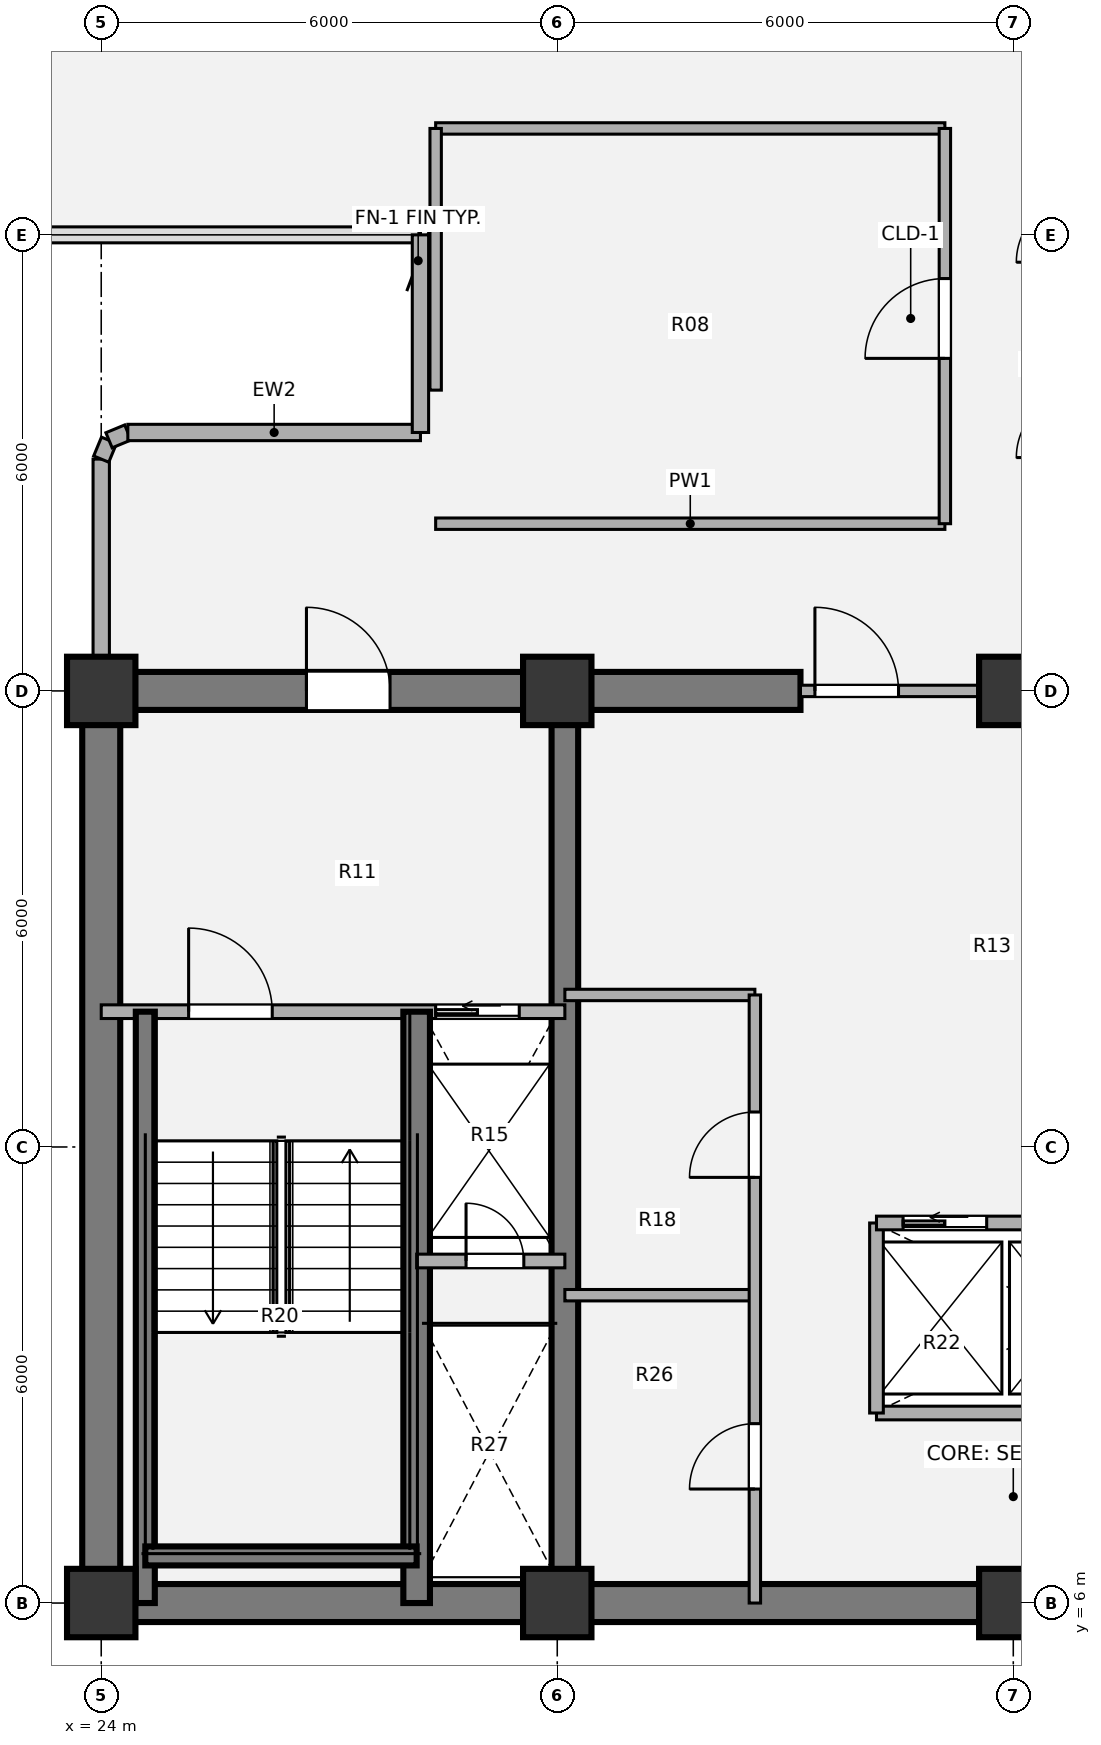
"""IFC4 building model, lengths in metres.
Left out: names, types, materials, properties, quantities, classifications, styles, units other than length and angle.
Written with IfcOpenShell. Run it as: python <this file> out.ifc"""

import sys

from ifc_helpers import new_model, si_unit, direction, frame, frame_2d, origin, origin_2d, place, context, subcontext, project, spatial, rectangle, extrude, source, transform, mapped, element, fill, save


model = new_model("IFC4")
c1 = context("Model", 3, precision=1e-05, world=origin(), true_north=direction((0.0, 1.0)))
c2 = subcontext(c1, "Body", "Model", "MODEL_VIEW")
j1 = project(units=[si_unit("LENGTHUNIT", "METRE"), si_unit("PLANEANGLEUNIT", "RADIAN")], contexts=[c1])
p1 = place(None, origin())
s1 = spatial("IfcSite", under=j1, at=p1, CompositionType="ELEMENT")
p2 = place(p1, origin())
s2 = spatial("IfcBuilding", under=s1, at=p2, CompositionType="ELEMENT")
p3 = place(p2, frame((0.0, 0.0, 112.5)))
s3 = spatial("IfcBuildingStorey", under=s2, at=p3, CompositionType="ELEMENT", Elevation=112.5)
m1 = source(origin(), c2, "Body", "SweptSolid", [
    extrude(rectangle(XDim=0.9, YDim=0.9, at=origin_2d()), origin(), (0.0, 0.0, 1.0), 3.78),
])
for number, where, z_axis, x_axis in (
    (1, (24.0, 6.0, 0.0), (0.0, 0.0, 1.0), (1.0, 0.0, 0.0)),
    (2, (30.0, 6.0, 0.0), (0.0, 0.0, 1.0), (1.0, 0.0, 0.0)),
    (3, (36.0, 6.0, 0.0), (0.0, 0.0, 1.0), (1.0, 0.0, 0.0)),
    (4, (24.0, 18.0, 0.0), (0.0, 0.0, 1.0), (1.0, 0.0, 0.0)),
    (5, (30.0, 18.0, 0.0), (0.0, 0.0, 1.0), (1.0, 0.0, 0.0)),
    (6, (36.0, 18.0, 0.0), (0.0, 0.0, 1.0), (1.0, 0.0, 0.0)),
):
    element("IfcColumn", number, at=place(p3, frame(where, z_axis=z_axis, x_axis=x_axis)), inside=s3, PredefinedType="COLUMN", context=c2, shape_type="MappedRepresentation", body=[
        mapped(m1, transform((0.0, 0.0, 0.0), x_axis=(1.0, 0.0, 0.0), y_axis=(0.0, 1.0, 0.0), z_axis=(0.0, 0.0, 1.0), scale=1.0)),
    ])
p4 = place(p3, frame((48.25, 6.0, 0.0), z_axis=(0.0, 0.0, 1.0), x_axis=(-1.0, 0.0, 0.0)))
e7 = element("IfcWall", 7, at=p4, inside=s3, PredefinedType="SHEAR", context=c2, shape_type="SweptSolid", body=[
    extrude(rectangle(XDim=24.5, YDim=0.5, at=frame_2d((12.25, 0.0))), origin(), (0.0, 0.0, 1.0), 3.78),
])
p5 = place(p3, frame((24.0, 6.0, 0.0), z_axis=(0.0, 0.0, 1.0), x_axis=(0.0, 1.0, 0.0)))
e8 = element("IfcWall", 8, at=p5, inside=s3, PredefinedType="SHEAR", context=c2, shape_type="SweptSolid", body=[
    extrude(rectangle(XDim=12.0, YDim=0.5, at=frame_2d((6.0, 0.0))), origin(), (0.0, 0.0, 1.0), 3.78),
])
p6 = place(p3, frame((23.75, 18.0, 0.0), z_axis=(0.0, 0.0, 1.0), x_axis=(1.0, 0.0, 0.0)))
e9 = element("IfcWall", 9, at=p6, inside=s3, PredefinedType="SHEAR", context=c2, shape_type="SweptSolid", body=[
    extrude(rectangle(XDim=9.45, YDim=0.5, at=frame_2d((4.725, 0.0))), origin(), (0.0, 0.0, 1.0), 3.78),
])
p7 = place(p6, frame((2.95, 0.0, 0.0)))
e10 = element("IfcOpeningElement", 10, at=p7, cuts=e9, PredefinedType="OPENING", context=c2, shape_type="SweptSolid", body=[
    extrude(rectangle(XDim=1.1, YDim=2.1, at=origin_2d()), frame((0.55, 0.26, 1.05), z_axis=(0.0, -1.0, 0.0), x_axis=(1.0, 0.0, 0.0)), (0.0, 0.0, 1.0), 0.52),
])
p8 = place(p3, frame((30.1, 6.0, 0.0), z_axis=(0.0, 0.0, 1.0), x_axis=(0.0, 1.0, 0.0)))
e11 = element("IfcWall", 11, at=p8, inside=s3, PredefinedType="SHEAR", context=c2, shape_type="SweptSolid", body=[
    extrude(rectangle(XDim=12.0, YDim=0.35, at=frame_2d((6.0, 0.0))), origin(), (0.0, 0.0, 1.0), 3.78),
])
p9 = place(p3, frame((24.0, 18.43, 0.0), z_axis=(0.0, 0.0, 1.0), x_axis=(0.0, 1.0, 0.0)))
e12 = element("IfcWall", 12, at=p9, inside=s3, PredefinedType="SOLIDWALL", context=c2, shape_type="SweptSolid", body=[
    extrude(rectangle(XDim=2.62, YDim=0.215, at=frame_2d((1.31, 0.0))), origin(), (0.0, 0.0, 1.0), 3.53),
])
p10 = place(p3, frame((24.0, 21.05, 0.0), z_axis=(0.0, 0.0, 1.0), x_axis=(0.382673670509, 0.923883575944, 0.0)))
e13 = element("IfcWall", 13, at=p10, inside=s3, PredefinedType="SOLIDWALL", context=c2, shape_type="SweptSolid", body=[
    extrude(rectangle(XDim=0.268, YDim=0.215, at=frame_2d((0.134, 0.0))), origin(), (0.0, 0.0, 1.0), 3.53),
])
p11 = place(p3, frame((24.103, 21.298, 0.0), z_axis=(0.0, 0.0, 1.0), x_axis=(0.924205486139, 0.381895560841, 0.0)))
e14 = element("IfcWall", 14, at=p11, inside=s3, PredefinedType="SOLIDWALL", context=c2, shape_type="SweptSolid", body=[
    extrude(rectangle(XDim=0.268, YDim=0.215, at=frame_2d((0.134, 0.0))), origin(), (0.0, 0.0, 1.0), 3.53),
])
p12 = place(p3, frame((24.35, 21.4, 0.0), z_axis=(0.0, 0.0, 1.0), x_axis=(1.0, 0.0, 0.0)))
e15 = element("IfcWall", 15, at=p12, inside=s3, PredefinedType="SOLIDWALL", context=c2, shape_type="SweptSolid", body=[
    extrude(rectangle(XDim=3.85, YDim=0.215, at=frame_2d((1.925, 0.0))), origin(), (0.0, 0.0, 1.0), 3.53),
])
p13 = place(p3, frame((28.2, 21.4, 0.0), z_axis=(0.0, 0.0, 1.0), x_axis=(0.0, 1.0, 0.0)))
e16 = element("IfcWall", 16, at=p13, inside=s3, PredefinedType="SOLIDWALL", context=c2, shape_type="SweptSolid", body=[
    extrude(rectangle(XDim=2.6, YDim=0.215, at=frame_2d((1.3, 0.0))), origin(), (0.0, 0.0, 1.0), 3.53),
])
p14 = place(p3, frame((30.1, 14.0, 0.0), z_axis=(0.0, 0.0, 1.0), x_axis=(1.0, 0.0, 0.0)))
e17 = element("IfcWall", 17, at=p14, inside=s3, PredefinedType="PARTITIONING", context=c2, shape_type="SweptSolid", body=[
    extrude(rectangle(XDim=2.5, YDim=0.15, at=frame_2d((1.25, 0.0))), origin(), (0.0, 0.0, 1.0), 3.5),
])
p15 = place(p3, frame((34.2, 8.5, 0.0), z_axis=(0.0, 0.0, 1.0), x_axis=(1.0, 0.0, 0.0)))
e18 = element("IfcWall", 18, at=p15, inside=s3, PredefinedType="PARTITIONING", context=c2, shape_type="SweptSolid", body=[
    extrude(rectangle(XDim=5.15, YDim=0.18, at=frame_2d((2.575, 0.0))), origin(), (0.0, 0.0, 1.0), 3.5),
])
p16 = place(p3, frame((34.2, 8.5, 0.0), z_axis=(0.0, 0.0, 1.0), x_axis=(0.0, 1.0, 0.0)))
e19 = element("IfcWall", 19, at=p16, inside=s3, PredefinedType="PARTITIONING", context=c2, shape_type="SweptSolid", body=[
    extrude(rectangle(XDim=2.5, YDim=0.18, at=frame_2d((1.25, 0.0))), origin(), (0.0, 0.0, 1.0), 3.5),
])
p17 = place(p3, frame((30.1, 10.05, 0.0), z_axis=(0.0, 0.0, 1.0), x_axis=(1.0, 0.0, 0.0)))
e20 = element("IfcWall", 20, at=p17, inside=s3, PredefinedType="PARTITIONING", context=c2, shape_type="SweptSolid", body=[
    extrude(rectangle(XDim=2.5, YDim=0.15, at=frame_2d((1.25, 0.0))), origin(), (0.0, 0.0, 1.0), 3.5),
])
p18 = place(p3, frame((32.6, 6.0, 0.0), z_axis=(0.0, 0.0, 1.0), x_axis=(0.0, 1.0, 0.0)))
e21 = element("IfcWall", 21, at=p18, inside=s3, PredefinedType="PARTITIONING", context=c2, shape_type="SweptSolid", body=[
    extrude(rectangle(XDim=8.0, YDim=0.15, at=frame_2d((4.0, 0.0))), origin(), (0.0, 0.0, 1.0), 3.5),
])
p19 = place(p18, frame((1.5, 0.0, 0.0)))
e22 = element("IfcOpeningElement", 22, at=p19, cuts=e21, PredefinedType="OPENING", context=c2, shape_type="SweptSolid", body=[
    extrude(rectangle(XDim=0.86, YDim=2.1, at=origin_2d()), frame((0.43, 0.085, 1.05), z_axis=(0.0, -1.0, 0.0), x_axis=(1.0, 0.0, 0.0)), (0.0, 0.0, 1.0), 0.17),
])
p20 = place(p18, frame((5.6, 0.0, 0.0)))
e23 = element("IfcOpeningElement", 23, at=p20, cuts=e21, PredefinedType="OPENING", context=c2, shape_type="SweptSolid", body=[
    extrude(rectangle(XDim=0.86, YDim=2.1, at=origin_2d()), frame((0.43, 0.085, 1.05), z_axis=(0.0, -1.0, 0.0), x_axis=(1.0, 0.0, 0.0)), (0.0, 0.0, 1.0), 0.17),
])
p21 = place(p3, frame((33.2, 18.0, 0.0), z_axis=(0.0, 0.0, 1.0), x_axis=(1.0, 0.0, 0.0)))
e24 = element("IfcWall", 24, at=p21, inside=s3, PredefinedType="PARTITIONING", context=c2, shape_type="SweptSolid", body=[
    extrude(rectangle(XDim=5.6, YDim=0.15, at=frame_2d((2.8, 0.0))), origin(), (0.0, 0.0, 1.0), 2.315),
])
p22 = place(p21, frame((0.19, 0.0, 0.0)))
e25 = element("IfcOpeningElement", 25, at=p22, cuts=e24, PredefinedType="OPENING", context=c2, shape_type="SweptSolid", body=[
    extrude(rectangle(XDim=1.1, YDim=2.1, at=origin_2d()), frame((0.55, 0.085, 1.05), z_axis=(0.0, -1.0, 0.0), x_axis=(1.0, 0.0, 0.0)), (0.0, 0.0, 1.0), 0.17),
])
p23 = place(p21, frame((4.31, 0.0, 0.0)))
e26 = element("IfcOpeningElement", 26, at=p23, cuts=e24, PredefinedType="OPENING", context=c2, shape_type="SweptSolid", body=[
    extrude(rectangle(XDim=1.1, YDim=2.1, at=origin_2d()), frame((0.55, 0.085, 1.05), z_axis=(0.0, -1.0, 0.0), x_axis=(1.0, 0.0, 0.0)), (0.0, 0.0, 1.0), 0.17),
])
p24 = place(p3, frame((24.0, 13.78, 0.0), z_axis=(0.0, 0.0, 1.0), x_axis=(1.0, 0.0, 0.0)))
e27 = element("IfcWall", 27, at=p24, inside=s3, PredefinedType="PARTITIONING", context=c2, shape_type="SweptSolid", body=[
    extrude(rectangle(XDim=6.1, YDim=0.18, at=frame_2d((3.05, 0.0))), origin(), (0.0, 0.0, 1.0), 3.5),
])
p25 = place(p24, frame((1.15, 0.0, 0.0)))
e28 = element("IfcOpeningElement", 28, at=p25, cuts=e27, PredefinedType="OPENING", context=c2, shape_type="SweptSolid", body=[
    extrude(rectangle(XDim=1.1, YDim=2.1, at=origin_2d()), frame((0.55, 0.1, 1.05), z_axis=(0.0, -1.0, 0.0), x_axis=(1.0, 0.0, 0.0)), (0.0, 0.0, 1.0), 0.2),
])
p26 = place(p24, frame((4.4, 0.0, 0.0)))
e29 = element("IfcOpeningElement", 29, at=p26, cuts=e27, PredefinedType="OPENING", context=c2, shape_type="SweptSolid", body=[
    extrude(rectangle(XDim=1.1, YDim=2.1, at=origin_2d()), frame((0.55, 0.1, 1.05), z_axis=(0.0, -1.0, 0.0), x_axis=(1.0, 0.0, 0.0)), (0.0, 0.0, 1.0), 0.2),
])
p27 = place(p3, frame((28.15, 6.0, 0.0), z_axis=(0.0, 0.0, 1.0), x_axis=(0.0, 1.0, 0.0)))
e30 = element("IfcWall", 30, at=p27, inside=s3, PredefinedType="SHEAR", context=c2, shape_type="SweptSolid", body=[
    extrude(rectangle(XDim=7.78, YDim=0.35, at=frame_2d((3.89, 0.0))), origin(), (0.0, 0.0, 1.0), 3.85),
])
p28 = place(p3, frame((24.58, 6.0, 0.0), z_axis=(0.0, 0.0, 1.0), x_axis=(0.0, 1.0, 0.0)))
e31 = element("IfcWall", 31, at=p28, inside=s3, PredefinedType="SHEAR", context=c2, shape_type="SweptSolid", body=[
    extrude(rectangle(XDim=7.78, YDim=0.25, at=frame_2d((3.89, 0.0))), origin(), (0.0, 0.0, 1.0), 3.85),
])
p29 = place(p3, frame((24.58, 6.62, 0.0), z_axis=(0.0, 0.0, 1.0), x_axis=(1.0, 0.0, 0.0)))
e32 = element("IfcWall", 32, at=p29, inside=s3, PredefinedType="SHEAR", context=c2, shape_type="SweptSolid", body=[
    extrude(rectangle(XDim=3.57, YDim=0.25, at=frame_2d((1.785, 0.0))), origin(), (0.0, 0.0, 1.0), 3.85),
])
p30 = place(p3, frame((28.15, 10.5, 0.0), z_axis=(0.0, 0.0, 1.0), x_axis=(1.0, 0.0, 0.0)))
e33 = element("IfcWall", 33, at=p30, inside=s3, PredefinedType="PARTITIONING", context=c2, shape_type="SweptSolid", body=[
    extrude(rectangle(XDim=1.95, YDim=0.18, at=frame_2d((0.975, 0.0))), origin(), (0.0, 0.0, 1.0), 3.5),
])
p31 = place(p30, frame((0.65, 0.0, 0.0)))
e34 = element("IfcOpeningElement", 34, at=p31, cuts=e33, PredefinedType="OPENING", context=c2, shape_type="SweptSolid", body=[
    extrude(rectangle(XDim=0.76, YDim=2.05, at=origin_2d()), frame((0.38, 0.1, 1.025), z_axis=(0.0, -1.0, 0.0), x_axis=(1.0, 0.0, 0.0)), (0.0, 0.0, 1.0), 0.2),
])
p32 = place(p3, frame((34.2, 11.0, 0.0), z_axis=(0.0, 0.0, 1.0), x_axis=(1.0, 0.0, 0.0)))
e35 = element("IfcWall", 35, at=p32, inside=s3, PredefinedType="PARTITIONING", context=c2, shape_type="SweptSolid", body=[
    extrude(rectangle(XDim=5.15, YDim=0.18, at=frame_2d((2.575, 0.0))), origin(), (0.0, 0.0, 1.0), 3.5),
])
p33 = place(p32, frame((0.35, 0.0, 0.0)))
e36 = element("IfcOpeningElement", 36, at=p33, cuts=e35, PredefinedType="OPENING", context=c2, shape_type="SweptSolid", body=[
    extrude(rectangle(XDim=1.1, YDim=2.1, at=origin_2d()), frame((0.55, 0.1, 1.05), z_axis=(0.0, -1.0, 0.0), x_axis=(1.0, 0.0, 0.0)), (0.0, 0.0, 1.0), 0.2),
])
p34 = place(p32, frame((2.05, 0.0, 0.0)))
e37 = element("IfcOpeningElement", 37, at=p34, cuts=e35, PredefinedType="OPENING", context=c2, shape_type="SweptSolid", body=[
    extrude(rectangle(XDim=1.1, YDim=2.1, at=origin_2d()), frame((0.55, 0.1, 1.05), z_axis=(0.0, -1.0, 0.0), x_axis=(1.0, 0.0, 0.0)), (0.0, 0.0, 1.0), 0.2),
])
p35 = place(p32, frame((3.7, 0.0, 0.0)))
e38 = element("IfcOpeningElement", 38, at=p35, cuts=e35, PredefinedType="OPENING", context=c2, shape_type="SweptSolid", body=[
    extrude(rectangle(XDim=1.1, YDim=2.1, at=origin_2d()), frame((0.55, 0.1, 1.05), z_axis=(0.0, -1.0, 0.0), x_axis=(1.0, 0.0, 0.0)), (0.0, 0.0, 1.0), 0.2),
])
for number, where, z_axis, x_axis in (
    (39, (28.4, 20.2, 0.0), (0.0, 0.0, 1.0), (1.0, 0.0, 0.0)),
    (40, (28.4, 25.4, 0.0), (0.0, 0.0, 1.0), (1.0, 0.0, 0.0)),
):
    element("IfcWall", number, at=place(p3, frame(where, z_axis=z_axis, x_axis=x_axis)), inside=s3, PredefinedType="PARTITIONING", context=c2, shape_type="SweptSolid", body=[
        extrude(rectangle(XDim=6.7, YDim=0.15, at=frame_2d((3.35, 0.0))), origin(), (0.0, 0.0, 1.0), 3.5),
    ])
p36 = place(p3, frame((28.4, 21.957, 0.0), z_axis=(0.0, 0.0, 1.0), x_axis=(0.0, 1.0, 0.0)))
e41 = element("IfcWall", 41, at=p36, inside=s3, PredefinedType="PARTITIONING", context=c2, shape_type="SweptSolid", body=[
    extrude(rectangle(XDim=3.443, YDim=0.15, at=frame_2d((1.721, 0.0))), origin(), (0.0, 0.0, 1.0), 3.5),
])
p37 = place(p3, frame((35.1, 20.2, 0.0), z_axis=(0.0, 0.0, 1.0), x_axis=(0.0, 1.0, 0.0)))
e42 = element("IfcWall", 42, at=p37, inside=s3, PredefinedType="PARTITIONING", context=c2, shape_type="SweptSolid", body=[
    extrude(rectangle(XDim=5.2, YDim=0.15, at=frame_2d((2.6, 0.0))), origin(), (0.0, 0.0, 1.0), 3.5),
])
p38 = place(p37, frame((2.175, 0.0, 0.0)))
e43 = element("IfcOpeningElement", 43, at=p38, cuts=e42, PredefinedType="OPENING", context=c2, shape_type="SweptSolid", body=[
    extrude(rectangle(XDim=1.05, YDim=2.1, at=origin_2d()), frame((0.525, 0.085, 1.05), z_axis=(0.0, -1.0, 0.0), x_axis=(1.0, 0.0, 0.0)), (0.0, 0.0, 1.0), 0.17),
])
m2 = source(origin(), c2, "Body", "SweptSolid", [
    extrude(rectangle(XDim=0.86, YDim=2.1, at=origin_2d()), frame((0.43, 0.025, 1.05), z_axis=(0.0, -1.0, 0.0), x_axis=(1.0, 0.0, 0.0)), (0.0, 0.0, 1.0), 0.05),
])
p39 = place(p19, origin())
e44 = element("IfcDoor", 44, at=p39, inside=s3, OperationType="SINGLE_SWING_LEFT", PredefinedType="DOOR", context=c2, shape_type="MappedRepresentation", body=[
    mapped(m2, transform((0.0, 0.0, 0.0), x_axis=(1.0, 0.0, 0.0), y_axis=(0.0, 1.0, 0.0), z_axis=(0.0, 0.0, 1.0), scale=1.0)),
])
fill(e22, e44)
p40 = place(p20, origin())
e45 = element("IfcDoor", 45, at=p40, inside=s3, OperationType="SINGLE_SWING_LEFT", PredefinedType="DOOR", context=c2, shape_type="MappedRepresentation", body=[
    mapped(m2, transform((0.0, 0.0, 0.0), x_axis=(1.0, 0.0, 0.0), y_axis=(0.0, 1.0, 0.0), z_axis=(0.0, 0.0, 1.0), scale=1.0)),
])
fill(e23, e45)
m3 = source(origin(), c2, "Body", "SweptSolid", [
    extrude(rectangle(XDim=1.1, YDim=2.1, at=origin_2d()), frame((0.55, 0.025, 1.05), z_axis=(0.0, -1.0, 0.0), x_axis=(1.0, 0.0, 0.0)), (0.0, 0.0, 1.0), 0.05),
])
p41 = place(p22, origin())
e46 = element("IfcDoor", 46, at=p41, inside=s3, OperationType="SINGLE_SWING_LEFT", PredefinedType="DOOR", context=c2, shape_type="MappedRepresentation", body=[
    mapped(m3, transform((0.0, 0.0, 0.0), x_axis=(1.0, 0.0, 0.0), y_axis=(0.0, 1.0, 0.0), z_axis=(0.0, 0.0, 1.0), scale=1.0)),
])
fill(e25, e46)
m4 = source(origin(), c2, "Body", "SweptSolid", [
    extrude(rectangle(XDim=1.1, YDim=2.1, at=origin_2d()), frame((0.55, 0.025, 1.05), z_axis=(0.0, -1.0, 0.0), x_axis=(1.0, 0.0, 0.0)), (0.0, 0.0, 1.0), 0.05),
])
p42 = place(p25, origin())
e47 = element("IfcDoor", 47, at=p42, inside=s3, OperationType="SINGLE_SWING_LEFT", PredefinedType="DOOR", context=c2, shape_type="MappedRepresentation", body=[
    mapped(m4, transform((0.0, 0.0, 0.0), x_axis=(1.0, 0.0, 0.0), y_axis=(0.0, 1.0, 0.0), z_axis=(0.0, 0.0, 1.0), scale=1.0)),
])
fill(e28, e47)
m5 = source(origin(), c2, "Body", "SweptSolid", [
    extrude(rectangle(XDim=1.1, YDim=2.1, at=origin_2d()), frame((0.55, 0.025, 1.05), z_axis=(0.0, -1.0, 0.0), x_axis=(1.0, 0.0, 0.0)), (0.0, 0.0, 1.0), 0.05),
])
p43 = place(p26, origin())
e48 = element("IfcDoor", 48, at=p43, inside=s3, OperationType="SLIDING_TO_LEFT", PredefinedType="DOOR", context=c2, shape_type="MappedRepresentation", body=[
    mapped(m5, transform((0.0, 0.0, 0.0), x_axis=(1.0, 0.0, 0.0), y_axis=(0.0, 1.0, 0.0), z_axis=(0.0, 0.0, 1.0), scale=1.0)),
])
fill(e29, e48)
m6 = source(origin(), c2, "Body", "SweptSolid", [
    extrude(rectangle(XDim=0.76, YDim=2.05, at=origin_2d()), frame((0.38, 0.025, 1.025), z_axis=(0.0, -1.0, 0.0), x_axis=(1.0, 0.0, 0.0)), (0.0, 0.0, 1.0), 0.05),
])
p44 = place(p31, origin())
e49 = element("IfcDoor", 49, at=p44, inside=s3, OperationType="SINGLE_SWING_LEFT", PredefinedType="DOOR", context=c2, shape_type="MappedRepresentation", body=[
    mapped(m6, transform((0.0, 0.0, 0.0), x_axis=(1.0, 0.0, 0.0), y_axis=(0.0, 1.0, 0.0), z_axis=(0.0, 0.0, 1.0), scale=1.0)),
])
fill(e34, e49)
p45 = place(p7, origin())
e50 = element("IfcDoor", 50, at=p45, inside=s3, OperationType="SINGLE_SWING_LEFT", PredefinedType="DOOR", context=c2, shape_type="MappedRepresentation", body=[
    mapped(m3, transform((0.0, 0.0, 0.0), x_axis=(1.0, 0.0, 0.0), y_axis=(0.0, 1.0, 0.0), z_axis=(0.0, 0.0, 1.0), scale=1.0)),
])
fill(e10, e50)
p46 = place(p33, origin())
e51 = element("IfcDoor", 51, at=p46, inside=s3, OperationType="SLIDING_TO_LEFT", PredefinedType="DOOR", context=c2, shape_type="MappedRepresentation", body=[
    mapped(m5, transform((0.0, 0.0, 0.0), x_axis=(1.0, 0.0, 0.0), y_axis=(0.0, 1.0, 0.0), z_axis=(0.0, 0.0, 1.0), scale=1.0)),
])
fill(e36, e51)
m7 = source(origin(), c2, "Body", "SweptSolid", [
    extrude(rectangle(XDim=1.05, YDim=2.1, at=origin_2d()), frame((0.525, 0.025, 1.05), z_axis=(0.0, -1.0, 0.0), x_axis=(1.0, 0.0, 0.0)), (0.0, 0.0, 1.0), 0.05),
])
p47 = place(p38, origin())
e52 = element("IfcDoor", 52, at=p47, inside=s3, OperationType="SINGLE_SWING_LEFT", PredefinedType="DOOR", context=c2, shape_type="MappedRepresentation", body=[
    mapped(m7, transform((0.0, 0.0, 0.0), x_axis=(1.0, 0.0, 0.0), y_axis=(0.0, 1.0, 0.0), z_axis=(0.0, 0.0, 1.0), scale=1.0)),
])
fill(e43, e52)
save(model, sys.argv[1])
